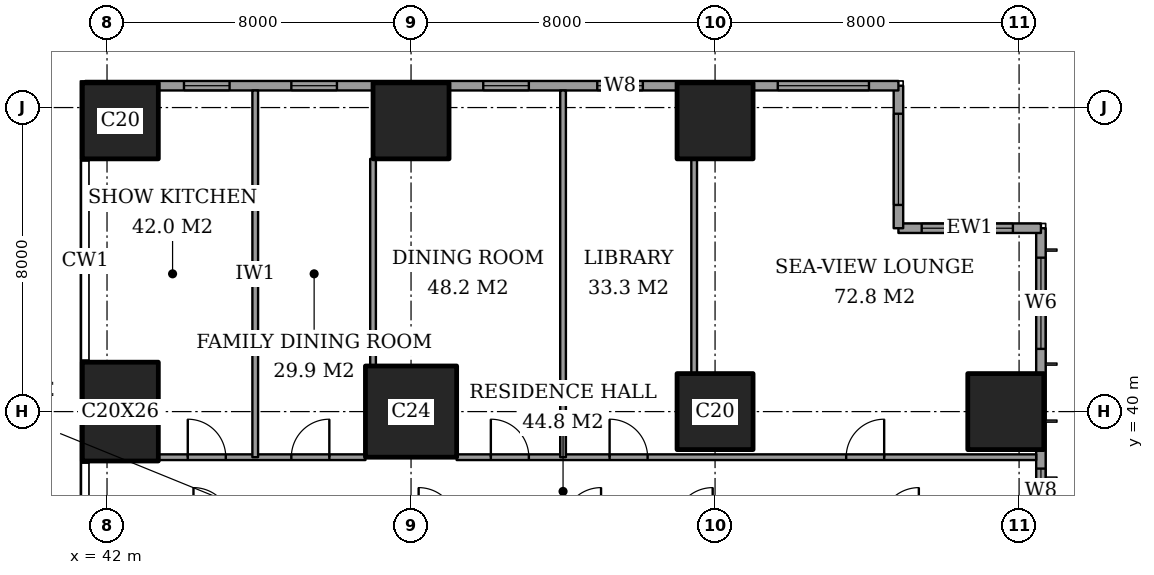
"""IFC4 building model, lengths in metres.
Left out: names, types, materials, properties, quantities, classifications, styles, units other than length and angle.
Written with IfcOpenShell. Run it as: python <this file> out.ifc"""

import sys

from ifc_helpers import new_model, si_unit, direction, frame, frame_2d, origin, origin_2d, place, context, subcontext, project, spatial, rectangle, extrude, element, fill, save


model = new_model("IFC4")
c1 = context("Model", 3, precision=1e-05, world=origin(), true_north=direction((0.0, 1.0)))
c2 = subcontext(c1, "Body", "Model", "MODEL_VIEW")
j1 = project(units=[si_unit("LENGTHUNIT", "METRE"), si_unit("PLANEANGLEUNIT", "RADIAN")], contexts=[c1])
p1 = place(None, origin())
s1 = spatial("IfcSite", under=j1, at=p1, CompositionType="ELEMENT")
p2 = place(p1, origin())
s2 = spatial("IfcBuilding", under=s1, at=p2, CompositionType="ELEMENT")
p3 = place(p2, frame((0.0, 0.0, 51.2)))
s3 = spatial("IfcBuildingStorey", under=s2, at=p3, CompositionType="ELEMENT", Elevation=51.2)
p4 = place(p3, frame((42.35, 40.0, 0.0), z_axis=(0.0, 0.0, 1.0), x_axis=(1.0, 0.0, 0.0)))
e1 = element("IfcColumn", 1, at=p4, inside=s3, PredefinedType="COLUMN", context=c2, shape_type="SweptSolid", body=[
    extrude(rectangle(XDim=2.0, YDim=2.6, at=origin_2d()), origin(), (0.0, 0.0, 1.0), 3.6),
])
p5 = place(p3, frame((42.35, 47.65, 0.0), z_axis=(0.0, 0.0, 1.0), x_axis=(1.0, 0.0, 0.0)))
e2 = element("IfcColumn", 2, at=p5, inside=s3, PredefinedType="COLUMN", context=c2, shape_type="SweptSolid", body=[
    extrude(rectangle(XDim=2.0, YDim=2.0, at=origin_2d()), origin(), (0.0, 0.0, 1.0), 3.6),
])
p6 = place(p3, frame((50.0, 40.0, 0.0), z_axis=(0.0, 0.0, 1.0), x_axis=(1.0, 0.0, 0.0)))
e3 = element("IfcColumn", 3, at=p6, inside=s3, PredefinedType="COLUMN", context=c2, shape_type="SweptSolid", body=[
    extrude(rectangle(XDim=2.4, YDim=2.4, at=origin_2d()), origin(), (0.0, 0.0, 1.0), 3.6),
])
for number, where, z_axis, x_axis in (
    (4, (50.0, 47.65, 0.0), (0.0, 0.0, 1.0), (1.0, 0.0, 0.0)),
    (5, (58.0, 40.0, 0.0), (0.0, 0.0, 1.0), (1.0, 0.0, 0.0)),
    (6, (58.0, 47.65, 0.0), (0.0, 0.0, 1.0), (1.0, 0.0, 0.0)),
    (7, (65.65, 40.0, 0.0), (0.0, 0.0, 1.0), (1.0, 0.0, 0.0)),
):
    element("IfcColumn", number, at=place(p3, frame(where, z_axis=z_axis, x_axis=x_axis)), inside=s3, PredefinedType="COLUMN", context=c2, shape_type="SweptSolid", body=[
        extrude(rectangle(XDim=2.0, YDim=2.0, at=origin_2d()), origin(), (0.0, 0.0, 1.0), 3.6),
    ])
p7 = place(p3, frame((66.575, 3.175, 0.0), z_axis=(0.0, 0.0, 1.0), x_axis=(0.0, 1.0, 0.0)))
e8 = element("IfcWall", 8, at=p7, inside=s3, PredefinedType="SOLIDWALL", context=c2, shape_type="SweptSolid", body=[
    extrude(rectangle(XDim=41.65, YDim=0.25, at=frame_2d((20.825, 0.0))), origin(), (0.0, 0.0, 1.0), 3.6),
])
p8 = place(p7, frame((0.775, 0.0, 0.6)))
e9 = element("IfcOpeningElement", 9, at=p8, cuts=e8, PredefinedType="OPENING", context=c2, shape_type="SweptSolid", body=[
    extrude(rectangle(XDim=2.4, YDim=2.0, at=frame_2d((1.2, 1.0))), frame((0.0, 0.135, 0.0), z_axis=(0.0, -1.0, 0.0), x_axis=(1.0, 0.0, 0.0)), (0.0, 0.0, 1.0), 0.27),
])
p9 = place(p7, frame((6.125, 0.0, 0.6)))
e10 = element("IfcOpeningElement", 10, at=p9, cuts=e8, PredefinedType="OPENING", context=c2, shape_type="SweptSolid", body=[
    extrude(rectangle(XDim=1.2, YDim=2.0, at=frame_2d((0.6, 1.0))), frame((0.0, 0.135, 0.0), z_axis=(0.0, -1.0, 0.0), x_axis=(1.0, 0.0, 0.0)), (0.0, 0.0, 1.0), 0.27),
])
p10 = place(p7, frame((8.375, 0.0, 0.6)))
e11 = element("IfcOpeningElement", 11, at=p10, cuts=e8, PredefinedType="OPENING", context=c2, shape_type="SweptSolid", body=[
    extrude(rectangle(XDim=2.4, YDim=2.0, at=frame_2d((1.2, 1.0))), frame((0.0, 0.135, 0.0), z_axis=(0.0, -1.0, 0.0), x_axis=(1.0, 0.0, 0.0)), (0.0, 0.0, 1.0), 0.27),
])
p11 = place(p7, frame((15.775, 0.0, 0.6)))
e12 = element("IfcOpeningElement", 12, at=p11, cuts=e8, PredefinedType="OPENING", context=c2, shape_type="SweptSolid", body=[
    extrude(rectangle(XDim=2.4, YDim=2.0, at=frame_2d((1.2, 1.0))), frame((0.0, 0.135, 0.0), z_axis=(0.0, -1.0, 0.0), x_axis=(1.0, 0.0, 0.0)), (0.0, 0.0, 1.0), 0.27),
])
p12 = place(p7, frame((23.475, 0.0, 0.6)))
e13 = element("IfcOpeningElement", 13, at=p12, cuts=e8, PredefinedType="OPENING", context=c2, shape_type="SweptSolid", body=[
    extrude(rectangle(XDim=2.4, YDim=2.0, at=frame_2d((1.2, 1.0))), frame((0.0, 0.135, 0.0), z_axis=(0.0, -1.0, 0.0), x_axis=(1.0, 0.0, 0.0)), (0.0, 0.0, 1.0), 0.27),
])
p13 = place(p7, frame((30.775, 0.0, 0.6)))
e14 = element("IfcOpeningElement", 14, at=p13, cuts=e8, PredefinedType="OPENING", context=c2, shape_type="SweptSolid", body=[
    extrude(rectangle(XDim=2.4, YDim=2.0, at=frame_2d((1.2, 1.0))), frame((0.0, 0.135, 0.0), z_axis=(0.0, -1.0, 0.0), x_axis=(1.0, 0.0, 0.0)), (0.0, 0.0, 1.0), 0.27),
])
p14 = place(p7, frame((34.125, 0.0, 0.6)))
e15 = element("IfcOpeningElement", 15, at=p14, cuts=e8, PredefinedType="OPENING", context=c2, shape_type="SweptSolid", body=[
    extrude(rectangle(XDim=1.2, YDim=2.0, at=frame_2d((0.6, 1.0))), frame((0.0, 0.135, 0.0), z_axis=(0.0, -1.0, 0.0), x_axis=(1.0, 0.0, 0.0)), (0.0, 0.0, 1.0), 0.27),
])
p15 = place(p7, frame((38.475, 0.0, 0.6)))
e16 = element("IfcOpeningElement", 16, at=p15, cuts=e8, PredefinedType="OPENING", context=c2, shape_type="SweptSolid", body=[
    extrude(rectangle(XDim=2.4, YDim=2.0, at=frame_2d((1.2, 1.0))), frame((0.0, 0.135, 0.0), z_axis=(0.0, -1.0, 0.0), x_axis=(1.0, 0.0, 0.0)), (0.0, 0.0, 1.0), 0.27),
])
p16 = place(p3, frame((66.575, 44.825, 0.0), z_axis=(0.0, 0.0, 1.0), x_axis=(-1.0, 0.0, 0.0)))
e17 = element("IfcWall", 17, at=p16, inside=s3, PredefinedType="SOLIDWALL", context=c2, shape_type="SweptSolid", body=[
    extrude(rectangle(XDim=3.75, YDim=0.25, at=frame_2d((1.875, 0.0))), origin(), (0.0, 0.0, 1.0), 3.6),
])
p17 = place(p16, frame((0.738, 0.0, 0.6)))
e18 = element("IfcOpeningElement", 18, at=p17, cuts=e17, PredefinedType="OPENING", context=c2, shape_type="SweptSolid", body=[
    extrude(rectangle(XDim=2.4, YDim=2.0, at=frame_2d((1.2, 1.0))), frame((0.0, 0.135, 0.0), z_axis=(0.0, -1.0, 0.0), x_axis=(1.0, 0.0, 0.0)), (0.0, 0.0, 1.0), 0.27),
])
p18 = place(p3, frame((62.825, 44.825, 0.0), z_axis=(0.0, 0.0, 1.0), x_axis=(0.0, 1.0, 0.0)))
e19 = element("IfcWall", 19, at=p18, inside=s3, PredefinedType="SOLIDWALL", context=c2, shape_type="SweptSolid", body=[
    extrude(rectangle(XDim=3.75, YDim=0.25, at=frame_2d((1.875, 0.0))), origin(), (0.0, 0.0, 1.0), 3.6),
])
p19 = place(p18, frame((0.613, 0.0, 0.6)))
e20 = element("IfcOpeningElement", 20, at=p19, cuts=e19, PredefinedType="OPENING", context=c2, shape_type="SweptSolid", body=[
    extrude(rectangle(XDim=2.4, YDim=2.0, at=frame_2d((1.2, 1.0))), frame((0.0, 0.135, 0.0), z_axis=(0.0, -1.0, 0.0), x_axis=(1.0, 0.0, 0.0)), (0.0, 0.0, 1.0), 0.27),
])
p20 = place(p3, frame((62.825, 48.575, 0.0), z_axis=(0.0, 0.0, 1.0), x_axis=(-1.0, 0.0, 0.0)))
e21 = element("IfcWall", 21, at=p20, inside=s3, PredefinedType="SOLIDWALL", context=c2, shape_type="SweptSolid", body=[
    extrude(rectangle(XDim=21.4, YDim=0.25, at=frame_2d((10.7, 0.0))), origin(), (0.0, 0.0, 1.0), 3.6),
])
p21 = place(p20, frame((0.775, 0.0, 0.6)))
e22 = element("IfcOpeningElement", 22, at=p21, cuts=e21, PredefinedType="OPENING", context=c2, shape_type="SweptSolid", body=[
    extrude(rectangle(XDim=2.4, YDim=2.0, at=frame_2d((1.2, 1.0))), frame((0.0, 0.135, 0.0), z_axis=(0.0, -1.0, 0.0), x_axis=(1.0, 0.0, 0.0)), (0.0, 0.0, 1.0), 0.27),
])
p22 = place(p20, frame((6.725, 0.0, 0.6)))
e23 = element("IfcOpeningElement", 23, at=p22, cuts=e21, PredefinedType="OPENING", context=c2, shape_type="SweptSolid", body=[
    extrude(rectangle(XDim=1.2, YDim=2.0, at=frame_2d((0.6, 1.0))), frame((0.0, 0.135, 0.0), z_axis=(0.0, -1.0, 0.0), x_axis=(1.0, 0.0, 0.0)), (0.0, 0.0, 1.0), 0.27),
])
p23 = place(p20, frame((9.725, 0.0, 0.6)))
e24 = element("IfcOpeningElement", 24, at=p23, cuts=e21, PredefinedType="OPENING", context=c2, shape_type="SweptSolid", body=[
    extrude(rectangle(XDim=1.2, YDim=2.0, at=frame_2d((0.6, 1.0))), frame((0.0, 0.135, 0.0), z_axis=(0.0, -1.0, 0.0), x_axis=(1.0, 0.0, 0.0)), (0.0, 0.0, 1.0), 0.27),
])
p24 = place(p20, frame((14.775, 0.0, 0.6)))
e25 = element("IfcOpeningElement", 25, at=p24, cuts=e21, PredefinedType="OPENING", context=c2, shape_type="SweptSolid", body=[
    extrude(rectangle(XDim=1.2, YDim=2.0, at=frame_2d((0.6, 1.0))), frame((0.0, 0.135, 0.0), z_axis=(0.0, -1.0, 0.0), x_axis=(1.0, 0.0, 0.0)), (0.0, 0.0, 1.0), 0.27),
])
p25 = place(p20, frame((17.6, 0.0, 0.6)))
e26 = element("IfcOpeningElement", 26, at=p25, cuts=e21, PredefinedType="OPENING", context=c2, shape_type="SweptSolid", body=[
    extrude(rectangle(XDim=1.2, YDim=2.0, at=frame_2d((0.6, 1.0))), frame((0.0, 0.135, 0.0), z_axis=(0.0, -1.0, 0.0), x_axis=(1.0, 0.0, 0.0)), (0.0, 0.0, 1.0), 0.27),
])
p26 = place(p3, frame((43.35, 38.8, 0.0), z_axis=(0.0, 0.0, 1.0), x_axis=(1.0, 0.0, 0.0)))
e27 = element("IfcWall", 27, at=p26, inside=s3, PredefinedType="PARTITIONING", context=c2, shape_type="SweptSolid", body=[
    extrude(rectangle(XDim=5.45, YDim=0.15, at=frame_2d((2.725, 0.0))), origin(), (0.0, 0.0, 1.0), 3.35),
])
p27 = place(p26, frame((3.5, 0.0, 0.0)))
e28 = element("IfcOpeningElement", 28, at=p27, cuts=e27, PredefinedType="OPENING", context=c2, shape_type="SweptSolid", body=[
    extrude(rectangle(XDim=1.0, YDim=2.1, at=frame_2d((0.5, 1.05))), frame((0.0, 0.085, 0.0), z_axis=(0.0, -1.0, 0.0), x_axis=(1.0, 0.0, 0.0)), (0.0, 0.0, 1.0), 0.17),
])
p28 = place(p26, frame((0.775, 0.0, 0.0)))
e29 = element("IfcOpeningElement", 29, at=p28, cuts=e27, PredefinedType="OPENING", context=c2, shape_type="SweptSolid", body=[
    extrude(rectangle(XDim=1.0, YDim=2.1, at=frame_2d((0.5, 1.05))), frame((0.0, 0.085, 0.0), z_axis=(0.0, -1.0, 0.0), x_axis=(1.0, 0.0, 0.0)), (0.0, 0.0, 1.0), 0.17),
])
p29 = place(p3, frame((51.2, 38.8, 0.0), z_axis=(0.0, 0.0, 1.0), x_axis=(1.0, 0.0, 0.0)))
e30 = element("IfcWall", 30, at=p29, inside=s3, PredefinedType="PARTITIONING", context=c2, shape_type="SweptSolid", body=[
    extrude(rectangle(XDim=15.25, YDim=0.15, at=frame_2d((7.625, 0.0))), origin(), (0.0, 0.0, 1.0), 3.35),
])
p30 = place(p29, frame((10.25, 0.0, 0.0)))
e31 = element("IfcOpeningElement", 31, at=p30, cuts=e30, PredefinedType="OPENING", context=c2, shape_type="SweptSolid", body=[
    extrude(rectangle(XDim=1.0, YDim=2.1, at=frame_2d((0.5, 1.05))), frame((0.0, 0.085, 0.0), z_axis=(0.0, -1.0, 0.0), x_axis=(1.0, 0.0, 0.0)), (0.0, 0.0, 1.0), 0.17),
])
p31 = place(p29, frame((4.025, 0.0, 0.0)))
e32 = element("IfcOpeningElement", 32, at=p31, cuts=e30, PredefinedType="OPENING", context=c2, shape_type="SweptSolid", body=[
    extrude(rectangle(XDim=1.0, YDim=2.1, at=frame_2d((0.5, 1.05))), frame((0.0, 0.085, 0.0), z_axis=(0.0, -1.0, 0.0), x_axis=(1.0, 0.0, 0.0)), (0.0, 0.0, 1.0), 0.17),
])
p32 = place(p29, frame((0.9, 0.0, 0.0)))
e33 = element("IfcOpeningElement", 33, at=p32, cuts=e30, PredefinedType="OPENING", context=c2, shape_type="SweptSolid", body=[
    extrude(rectangle(XDim=1.0, YDim=2.1, at=frame_2d((0.5, 1.05))), frame((0.0, 0.085, 0.0), z_axis=(0.0, -1.0, 0.0), x_axis=(1.0, 0.0, 0.0)), (0.0, 0.0, 1.0), 0.17),
])
p33 = place(p3, frame((45.9, 38.8, 0.0), z_axis=(0.0, 0.0, 1.0), x_axis=(0.0, 1.0, 0.0)))
e34 = element("IfcWall", 34, at=p33, inside=s3, PredefinedType="PARTITIONING", context=c2, shape_type="SweptSolid", body=[
    extrude(rectangle(XDim=9.65, YDim=0.15, at=frame_2d((4.825, 0.0))), origin(), (0.0, 0.0, 1.0), 3.35),
])
p34 = place(p3, frame((49.0, 41.2, 0.0), z_axis=(0.0, 0.0, 1.0), x_axis=(0.0, 1.0, 0.0)))
e35 = element("IfcWall", 35, at=p34, inside=s3, PredefinedType="PARTITIONING", context=c2, shape_type="SweptSolid", body=[
    extrude(rectangle(XDim=5.45, YDim=0.15, at=frame_2d((2.725, 0.0))), origin(), (0.0, 0.0, 1.0), 3.35),
])
p35 = place(p3, frame((54.0, 38.8, 0.0), z_axis=(0.0, 0.0, 1.0), x_axis=(0.0, 1.0, 0.0)))
e36 = element("IfcWall", 36, at=p35, inside=s3, PredefinedType="PARTITIONING", context=c2, shape_type="SweptSolid", body=[
    extrude(rectangle(XDim=9.65, YDim=0.15, at=frame_2d((4.825, 0.0))), origin(), (0.0, 0.0, 1.0), 3.35),
])
p36 = place(p3, frame((57.45, 41.0, 0.0), z_axis=(0.0, 0.0, 1.0), x_axis=(0.0, 1.0, 0.0)))
e37 = element("IfcWall", 37, at=p36, inside=s3, PredefinedType="PARTITIONING", context=c2, shape_type="SweptSolid", body=[
    extrude(rectangle(XDim=5.65, YDim=0.15, at=frame_2d((2.825, 0.0))), origin(), (0.0, 0.0, 1.0), 3.35),
])
p37 = place(p14, origin())
e38 = element("IfcWindow", 38, at=p37, inside=s3, PartitioningType="SINGLE_PANEL", PredefinedType="WINDOW", context=c2, shape_type="SweptSolid", body=[
    extrude(rectangle(XDim=1.2, YDim=2.0, at=frame_2d((0.6, 1.0))), frame((0.0, 0.03, 0.0), z_axis=(0.0, -1.0, 0.0), x_axis=(1.0, 0.0, 0.0)), (0.0, 0.0, 1.0), 0.06),
])
fill(e15, e38)
p38 = place(p15, origin())
e39 = element("IfcWindow", 39, at=p38, inside=s3, PartitioningType="SINGLE_PANEL", PredefinedType="WINDOW", context=c2, shape_type="SweptSolid", body=[
    extrude(rectangle(XDim=2.4, YDim=2.0, at=frame_2d((1.2, 1.0))), frame((0.0, 0.03, 0.0), z_axis=(0.0, -1.0, 0.0), x_axis=(1.0, 0.0, 0.0)), (0.0, 0.0, 1.0), 0.06),
])
fill(e16, e39)
p39 = place(p17, origin())
e40 = element("IfcWindow", 40, at=p39, inside=s3, PartitioningType="SINGLE_PANEL", PredefinedType="WINDOW", context=c2, shape_type="SweptSolid", body=[
    extrude(rectangle(XDim=2.4, YDim=2.0, at=frame_2d((1.2, 1.0))), frame((0.0, 0.03, 0.0), z_axis=(0.0, -1.0, 0.0), x_axis=(1.0, 0.0, 0.0)), (0.0, 0.0, 1.0), 0.06),
])
fill(e18, e40)
p40 = place(p19, origin())
e41 = element("IfcWindow", 41, at=p40, inside=s3, PartitioningType="SINGLE_PANEL", PredefinedType="WINDOW", context=c2, shape_type="SweptSolid", body=[
    extrude(rectangle(XDim=2.4, YDim=2.0, at=frame_2d((1.2, 1.0))), frame((0.0, 0.03, 0.0), z_axis=(0.0, -1.0, 0.0), x_axis=(1.0, 0.0, 0.0)), (0.0, 0.0, 1.0), 0.06),
])
fill(e20, e41)
p41 = place(p21, origin())
e42 = element("IfcWindow", 42, at=p41, inside=s3, PartitioningType="SINGLE_PANEL", PredefinedType="WINDOW", context=c2, shape_type="SweptSolid", body=[
    extrude(rectangle(XDim=2.4, YDim=2.0, at=frame_2d((1.2, 1.0))), frame((0.0, 0.03, 0.0), z_axis=(0.0, -1.0, 0.0), x_axis=(1.0, 0.0, 0.0)), (0.0, 0.0, 1.0), 0.06),
])
fill(e22, e42)
p42 = place(p22, origin())
e43 = element("IfcWindow", 43, at=p42, inside=s3, PartitioningType="SINGLE_PANEL", PredefinedType="WINDOW", context=c2, shape_type="SweptSolid", body=[
    extrude(rectangle(XDim=1.2, YDim=2.0, at=frame_2d((0.6, 1.0))), frame((0.0, 0.03, 0.0), z_axis=(0.0, -1.0, 0.0), x_axis=(1.0, 0.0, 0.0)), (0.0, 0.0, 1.0), 0.06),
])
fill(e23, e43)
p43 = place(p23, origin())
e44 = element("IfcWindow", 44, at=p43, inside=s3, PartitioningType="SINGLE_PANEL", PredefinedType="WINDOW", context=c2, shape_type="SweptSolid", body=[
    extrude(rectangle(XDim=1.2, YDim=2.0, at=frame_2d((0.6, 1.0))), frame((0.0, 0.03, 0.0), z_axis=(0.0, -1.0, 0.0), x_axis=(1.0, 0.0, 0.0)), (0.0, 0.0, 1.0), 0.06),
])
fill(e24, e44)
p44 = place(p24, origin())
e45 = element("IfcWindow", 45, at=p44, inside=s3, PartitioningType="SINGLE_PANEL", PredefinedType="WINDOW", context=c2, shape_type="SweptSolid", body=[
    extrude(rectangle(XDim=1.2, YDim=2.0, at=frame_2d((0.6, 1.0))), frame((0.0, 0.03, 0.0), z_axis=(0.0, -1.0, 0.0), x_axis=(1.0, 0.0, 0.0)), (0.0, 0.0, 1.0), 0.06),
])
fill(e25, e45)
p45 = place(p25, origin())
e46 = element("IfcWindow", 46, at=p45, inside=s3, PartitioningType="SINGLE_PANEL", PredefinedType="WINDOW", context=c2, shape_type="SweptSolid", body=[
    extrude(rectangle(XDim=1.2, YDim=2.0, at=frame_2d((0.6, 1.0))), frame((0.0, 0.03, 0.0), z_axis=(0.0, -1.0, 0.0), x_axis=(1.0, 0.0, 0.0)), (0.0, 0.0, 1.0), 0.06),
])
fill(e26, e46)
p46 = place(p30, origin())
e47 = element("IfcDoor", 47, at=p46, inside=s3, OperationType="SINGLE_SWING_LEFT", PredefinedType="DOOR", context=c2, shape_type="SweptSolid", body=[
    extrude(rectangle(XDim=1.0, YDim=2.1, at=frame_2d((0.5, 1.05))), frame((0.0, 0.025, 0.0), z_axis=(0.0, -1.0, 0.0), x_axis=(1.0, 0.0, 0.0)), (0.0, 0.0, 1.0), 0.05),
])
fill(e31, e47)
p47 = place(p31, origin())
e48 = element("IfcDoor", 48, at=p47, inside=s3, OperationType="SINGLE_SWING_RIGHT", PredefinedType="DOOR", context=c2, shape_type="SweptSolid", body=[
    extrude(rectangle(XDim=1.0, YDim=2.1, at=frame_2d((0.5, 1.05))), frame((0.0, 0.025, 0.0), z_axis=(0.0, -1.0, 0.0), x_axis=(1.0, 0.0, 0.0)), (0.0, 0.0, 1.0), 0.05),
])
fill(e32, e48)
p48 = place(p32, origin())
e49 = element("IfcDoor", 49, at=p48, inside=s3, OperationType="SINGLE_SWING_RIGHT", PredefinedType="DOOR", context=c2, shape_type="SweptSolid", body=[
    extrude(rectangle(XDim=1.0, YDim=2.1, at=frame_2d((0.5, 1.05))), frame((0.0, 0.025, 0.0), z_axis=(0.0, -1.0, 0.0), x_axis=(1.0, 0.0, 0.0)), (0.0, 0.0, 1.0), 0.05),
])
fill(e33, e49)
p49 = place(p27, origin())
e50 = element("IfcDoor", 50, at=p49, inside=s3, OperationType="SINGLE_SWING_LEFT", PredefinedType="DOOR", context=c2, shape_type="SweptSolid", body=[
    extrude(rectangle(XDim=1.0, YDim=2.1, at=frame_2d((0.5, 1.05))), frame((0.0, 0.025, 0.0), z_axis=(0.0, -1.0, 0.0), x_axis=(1.0, 0.0, 0.0)), (0.0, 0.0, 1.0), 0.05),
])
fill(e28, e50)
p50 = place(p28, origin())
e51 = element("IfcDoor", 51, at=p50, inside=s3, OperationType="SINGLE_SWING_RIGHT", PredefinedType="DOOR", context=c2, shape_type="SweptSolid", body=[
    extrude(rectangle(XDim=1.0, YDim=2.1, at=frame_2d((0.5, 1.05))), frame((0.0, 0.025, 0.0), z_axis=(0.0, -1.0, 0.0), x_axis=(1.0, 0.0, 0.0)), (0.0, 0.0, 1.0), 0.05),
])
fill(e29, e51)
save(model, sys.argv[1])
